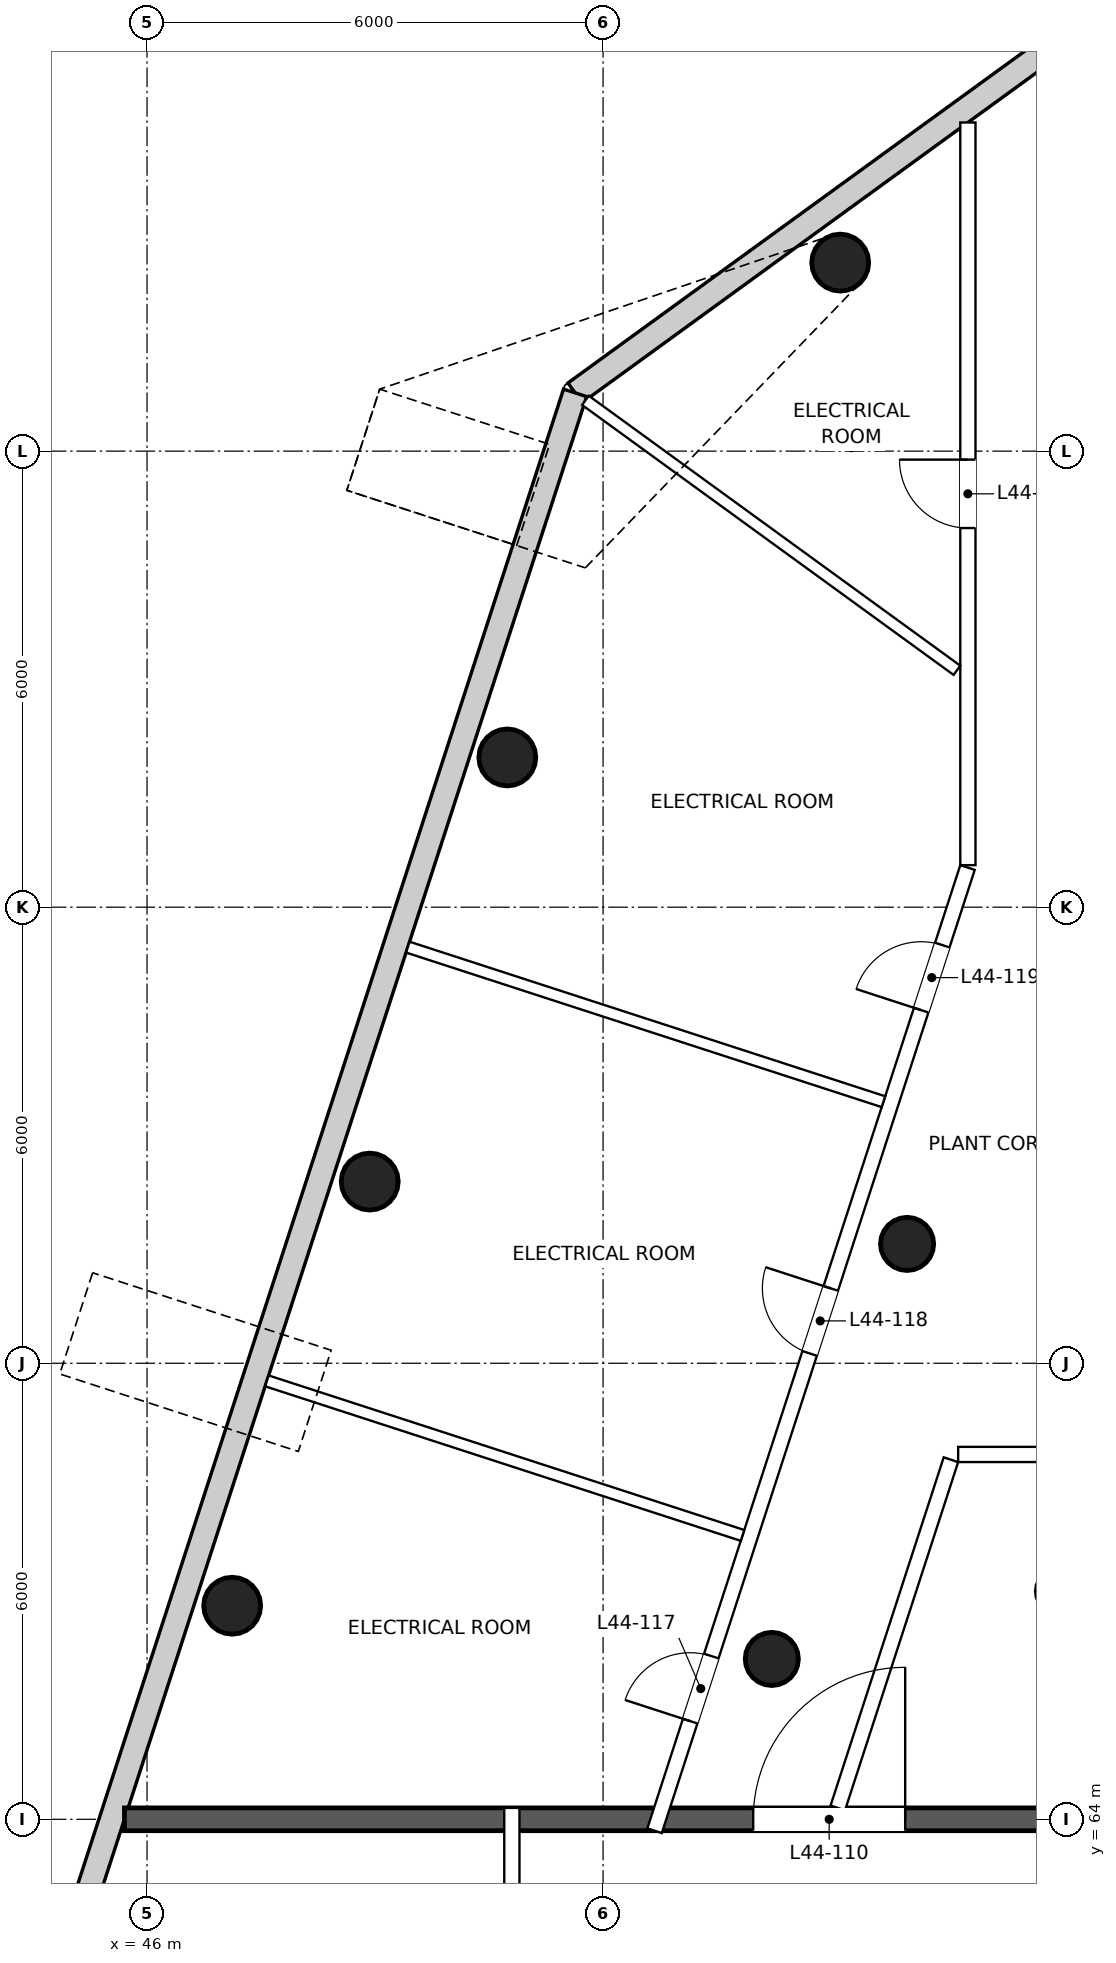
"""IFC4 building model, lengths in metres.
Left out: names, types, materials, properties, quantities, classifications, styles, units other than length and angle.
Written with IfcOpenShell. Run it as: python <this file> out.ifc"""

import sys

from ifc_helpers import new_model, si_unit, direction, frame, frame_2d, origin, origin_2d, place, context, subcontext, project, spatial, rectangle, circle, extrude, element, fill, save


model = new_model("IFC4")
c1 = context("Model", 3, precision=1e-05, world=origin(), true_north=direction((0.0, 1.0)))
c2 = subcontext(c1, "Body", "Model", "MODEL_VIEW")
j1 = project(units=[si_unit("LENGTHUNIT", "METRE"), si_unit("PLANEANGLEUNIT", "RADIAN")], contexts=[c1])
p1 = place(None, origin())
s1 = spatial("IfcSite", under=j1, at=p1, CompositionType="ELEMENT")
p2 = place(p1, origin())
s2 = spatial("IfcBuilding", under=s1, at=p2, CompositionType="ELEMENT")
p3 = place(p2, frame((0.0, 0.0, 191.5)))
s3 = spatial("IfcBuildingStorey", under=s2, at=p3, CompositionType="ELEMENT", Elevation=191.5)
for number, where, z_axis, x_axis in (
    (1, (55.12, 84.48, 0.0), (0.0, 0.0, 1.0), (1.0, 0.0, 0.0)),
    (2, (50.74, 77.97, 0.0), (0.0, 0.0, 1.0), (1.0, 0.0, 0.0)),
    (3, (48.93, 72.39, 0.0), (0.0, 0.0, 1.0), (1.0, 0.0, 0.0)),
    (4, (47.12, 66.81, 0.0), (0.0, 0.0, 1.0), (1.0, 0.0, 0.0)),
):
    element("IfcColumn", number, at=place(p3, frame(where, z_axis=z_axis, x_axis=x_axis)), inside=s3, PredefinedType="COLUMN", context=c2, shape_type="SweptSolid", body=[
        extrude(circle(Radius=0.375, at=origin_2d()), origin(), (0.0, 0.0, 1.0), 5.0),
    ])
for number, where, z_axis, x_axis in (
    (5, (56.0, 71.57, 0.0), (0.0, 0.0, 1.0), (1.0, 0.0, 0.0)),
    (6, (54.22, 66.11, 0.0), (0.0, 0.0, 1.0), (1.0, 0.0, 0.0)),
):
    element("IfcColumn", number, at=place(p3, frame(where, z_axis=z_axis, x_axis=x_axis)), inside=s3, PredefinedType="COLUMN", context=c2, shape_type="SweptSolid", body=[
        extrude(circle(Radius=0.35, at=origin_2d()), origin(), (0.0, 0.0, 1.0), 5.0),
    ])
p4 = place(p3, frame((58.615, 87.84, 0.0), z_axis=(0.0, 0.0, 1.0), x_axis=(-0.809011202415, -0.587793224159, 0.0)))
e7 = element("IfcWall", 7, at=p4, inside=s3, PredefinedType="SOLIDWALL", context=c2, shape_type="SweptSolid", body=[
    extrude(rectangle(XDim=8.631, YDim=0.32, at=frame_2d((4.316, 0.0))), origin(), (0.0, 0.0, 1.0), 4.7),
])
p5 = place(p3, frame((51.632, 82.767, 0.0), z_axis=(0.0, 0.0, 1.0), x_axis=(-0.309022366866, -0.95105477065, 0.0)))
e8 = element("IfcWall", 8, at=p5, inside=s3, PredefinedType="SOLIDWALL", context=c2, shape_type="SweptSolid", body=[
    extrude(rectangle(XDim=21.231, YDim=0.32, at=frame_2d((10.615, 0.0))), origin(), (0.0, 0.0, 1.0), 4.7),
])
p6 = place(p3, frame((45.703, 64.0, 0.0), z_axis=(0.0, 0.0, 1.0), x_axis=(1.0, 0.0, 0.0)))
e9 = element("IfcWall", 9, at=p6, inside=s3, PredefinedType="PARTITIONING", context=c2, shape_type="SweptSolid", body=[
    extrude(rectangle(XDim=48.595, YDim=0.3, at=frame_2d((24.297, 0.0))), origin(), (0.0, 0.0, 1.0), 3.7),
])
p7 = place(p6, frame((8.272, 0.0, 0.0)))
e10 = element("IfcOpeningElement", 10, at=p7, cuts=e9, PredefinedType="OPENING", context=c2, shape_type="SweptSolid", body=[
    extrude(rectangle(XDim=2.0, YDim=2.1, at=frame_2d((1.0, 1.05))), frame((0.0, 0.16, 0.0), z_axis=(0.0, -1.0, 0.0), x_axis=(1.0, 0.0, 0.0)), (0.0, 0.0, 1.0), 0.32),
])
p8 = place(p6, frame((16.322, 0.0, 0.0)))
e11 = element("IfcOpeningElement", 11, at=p8, cuts=e9, PredefinedType="OPENING", context=c2, shape_type="SweptSolid", body=[
    extrude(rectangle(XDim=2.0, YDim=2.1, at=frame_2d((1.0, 1.05))), frame((0.0, 0.16, 0.0), z_axis=(0.0, -1.0, 0.0), x_axis=(1.0, 0.0, 0.0)), (0.0, 0.0, 1.0), 0.32),
])
p9 = place(p6, frame((23.697, 0.0, 0.0)))
e12 = element("IfcOpeningElement", 12, at=p9, cuts=e9, PredefinedType="OPENING", context=c2, shape_type="SweptSolid", body=[
    extrude(rectangle(XDim=1.2, YDim=2.1, at=frame_2d((0.6, 1.05))), frame((0.0, 0.16, 0.0), z_axis=(0.0, -1.0, 0.0), x_axis=(1.0, 0.0, 0.0)), (0.0, 0.0, 1.0), 0.32),
])
p10 = place(p6, frame((30.272, 0.0, 0.0)))
e13 = element("IfcOpeningElement", 13, at=p10, cuts=e9, PredefinedType="OPENING", context=c2, shape_type="SweptSolid", body=[
    extrude(rectangle(XDim=2.0, YDim=2.1, at=frame_2d((1.0, 1.05))), frame((0.0, 0.16, 0.0), z_axis=(0.0, -1.0, 0.0), x_axis=(1.0, 0.0, 0.0)), (0.0, 0.0, 1.0), 0.32),
])
p11 = place(p6, frame((38.322, 0.0, 0.0)))
e14 = element("IfcOpeningElement", 14, at=p11, cuts=e9, PredefinedType="OPENING", context=c2, shape_type="SweptSolid", body=[
    extrude(rectangle(XDim=2.0, YDim=2.1, at=frame_2d((1.0, 1.05))), frame((0.0, 0.16, 0.0), z_axis=(0.0, -1.0, 0.0), x_axis=(1.0, 0.0, 0.0)), (0.0, 0.0, 1.0), 0.32),
])
p12 = place(p3, frame((52.678, 63.85, 0.0), z_axis=(0.0, 0.0, 1.0), x_axis=(0.309023094896, 0.951054534094, 0.0)))
e15 = element("IfcWall", 15, at=p12, inside=s3, PredefinedType="PARTITIONING", context=c2, shape_type="SweptSolid", body=[
    extrude(rectangle(XDim=13.324, YDim=0.2, at=frame_2d((6.662, 0.0))), origin(), (0.0, 0.0, 1.0), 3.7),
])
p13 = place(p12, frame((1.516, 0.0, 0.0)))
e16 = element("IfcOpeningElement", 16, at=p13, cuts=e15, PredefinedType="OPENING", context=c2, shape_type="SweptSolid", body=[
    extrude(rectangle(XDim=0.9, YDim=2.1, at=frame_2d((0.45, 1.05))), frame((0.0, 0.11, 0.0), z_axis=(0.0, -1.0, 0.0), x_axis=(1.0, 0.0, 0.0)), (0.0, 0.0, 1.0), 0.22),
])
p14 = place(p12, frame((6.602, 0.0, 0.0)))
e17 = element("IfcOpeningElement", 17, at=p14, cuts=e15, PredefinedType="OPENING", context=c2, shape_type="SweptSolid", body=[
    extrude(rectangle(XDim=0.9, YDim=2.1, at=frame_2d((0.45, 1.05))), frame((0.0, 0.11, 0.0), z_axis=(0.0, -1.0, 0.0), x_axis=(1.0, 0.0, 0.0)), (0.0, 0.0, 1.0), 0.22),
])
p15 = place(p12, frame((11.351, 0.0, 0.0)))
e18 = element("IfcOpeningElement", 18, at=p15, cuts=e15, PredefinedType="OPENING", context=c2, shape_type="SweptSolid", body=[
    extrude(rectangle(XDim=0.9, YDim=2.1, at=frame_2d((0.45, 1.05))), frame((0.0, 0.11, 0.0), z_axis=(0.0, -1.0, 0.0), x_axis=(1.0, 0.0, 0.0)), (0.0, 0.0, 1.0), 0.22),
])
p16 = place(p3, frame((56.8, 76.553, 0.0), z_axis=(0.0, 0.0, 1.0), x_axis=(0.0, 1.0, 0.0)))
e19 = element("IfcWall", 19, at=p16, inside=s3, PredefinedType="PARTITIONING", context=c2, shape_type="SweptSolid", body=[
    extrude(rectangle(XDim=9.771, YDim=0.2, at=frame_2d((4.885, 0.0))), origin(), (0.0, 0.0, 1.0), 4.25),
])
p17 = place(p16, frame((4.435, 0.0, 0.0)))
e20 = element("IfcOpeningElement", 20, at=p17, cuts=e19, PredefinedType="OPENING", context=c2, shape_type="SweptSolid", body=[
    extrude(rectangle(XDim=0.9, YDim=2.1, at=frame_2d((0.45, 1.05))), frame((0.0, 0.11, 0.0), z_axis=(0.0, -1.0, 0.0), x_axis=(1.0, 0.0, 0.0)), (0.0, 0.0, 1.0), 0.22),
])
p18 = place(p3, frame((50.8, 55.8, 0.0), z_axis=(0.0, 0.0, 1.0), x_axis=(0.0, 1.0, 0.0)))
e21 = element("IfcWall", 21, at=p18, inside=s3, PredefinedType="PARTITIONING", context=c2, shape_type="SweptSolid", body=[
    extrude(rectangle(XDim=8.35, YDim=0.2, at=frame_2d((4.175, 0.0))), origin(), (0.0, 0.0, 1.0), 4.25),
])
p19 = place(p18, frame((3.574, 0.0, 0.0)))
e22 = element("IfcOpeningElement", 22, at=p19, cuts=e21, PredefinedType="OPENING", context=c2, shape_type="SweptSolid", body=[
    extrude(rectangle(XDim=0.9, YDim=2.1, at=frame_2d((0.45, 1.05))), frame((0.0, 0.11, 0.0), z_axis=(0.0, -1.0, 0.0), x_axis=(1.0, 0.0, 0.0)), (0.0, 0.0, 1.0), 0.22),
])
p20 = place(p3, frame((68.8, 68.8, 0.0), z_axis=(0.0, 0.0, 1.0), x_axis=(-1.0, 0.0, 0.0)))
e23 = element("IfcWall", 23, at=p20, inside=s3, PredefinedType="PARTITIONING", context=c2, shape_type="SweptSolid", body=[
    extrude(rectangle(XDim=12.128, YDim=0.2, at=frame_2d((6.064, 0.0))), origin(), (0.0, 0.0, 1.0), 4.7),
])
p21 = place(p20, frame((8.894, 0.0, 0.0)))
e24 = element("IfcOpeningElement", 24, at=p21, cuts=e23, PredefinedType="OPENING", context=c2, shape_type="SweptSolid", body=[
    extrude(rectangle(XDim=0.9, YDim=2.1, at=frame_2d((0.45, 1.05))), frame((0.0, 0.11, 0.0), z_axis=(0.0, -1.0, 0.0), x_axis=(1.0, 0.0, 0.0)), (0.0, 0.0, 1.0), 0.22),
])
p22 = place(p3, frame((56.577, 68.731, 0.0), z_axis=(0.0, 0.0, 1.0), x_axis=(-0.309026476021, -0.951053435469, 0.0)))
e25 = element("IfcWall", 25, at=p22, inside=s3, PredefinedType="PARTITIONING", context=c2, shape_type="SweptSolid", body=[
    extrude(rectangle(XDim=4.817, YDim=0.2, at=frame_2d((2.408, 0.0))), origin(), (0.0, 0.0, 1.0), 3.7),
])
p23 = place(p3, frame((51.768, 82.668, 0.0), z_axis=(0.0, 0.0, 1.0), x_axis=(0.809024323682, -0.587775164234, 0.0)))
e26 = element("IfcWall", 26, at=p23, inside=s3, PredefinedType="PARTITIONING", context=c2, shape_type="SweptSolid", body=[
    extrude(rectangle(XDim=6.042, YDim=0.15, at=frame_2d((3.021, 0.0))), origin(), (0.0, 0.0, 1.0), 4.25),
])
p24 = place(p3, frame((49.431, 75.475, 0.0), z_axis=(0.0, 0.0, 1.0), x_axis=(0.95105288048, -0.309028184041, 0.0)))
e27 = element("IfcWall", 27, at=p24, inside=s3, PredefinedType="PARTITIONING", context=c2, shape_type="SweptSolid", body=[
    extrude(rectangle(XDim=6.58, YDim=0.15, at=frame_2d((3.29, 0.0))), origin(), (0.0, 0.0, 1.0), 3.7),
])
p25 = place(p3, frame((47.577, 69.768, 0.0), z_axis=(0.0, 0.0, 1.0), x_axis=(0.951060241863, -0.309005528021, 0.0)))
e28 = element("IfcWall", 28, at=p25, inside=s3, PredefinedType="PARTITIONING", context=c2, shape_type="SweptSolid", body=[
    extrude(rectangle(XDim=6.58, YDim=0.15, at=frame_2d((3.29, 0.0))), origin(), (0.0, 0.0, 1.0), 3.7),
])
p26 = place(p7, origin())
e29 = element("IfcDoor", 29, at=p26, inside=s3, OperationType="DOUBLE_DOOR_SINGLE_SWING", PredefinedType="DOOR", context=c2, shape_type="SweptSolid", body=[
    extrude(rectangle(XDim=2.0, YDim=2.1, at=frame_2d((1.0, 1.05))), frame((0.0, 0.025, 0.0), z_axis=(0.0, -1.0, 0.0), x_axis=(1.0, 0.0, 0.0)), (0.0, 0.0, 1.0), 0.05),
])
fill(e10, e29)
p27 = place(p13, origin())
e30 = element("IfcDoor", 30, at=p27, inside=s3, OperationType="SINGLE_SWING_LEFT", PredefinedType="DOOR", context=c2, shape_type="SweptSolid", body=[
    extrude(rectangle(XDim=0.9, YDim=2.1, at=frame_2d((0.45, 1.05))), frame((0.0, 0.025, 0.0), z_axis=(0.0, -1.0, 0.0), x_axis=(1.0, 0.0, 0.0)), (0.0, 0.0, 1.0), 0.05),
])
fill(e16, e30)
p28 = place(p14, origin())
e31 = element("IfcDoor", 31, at=p28, inside=s3, OperationType="SINGLE_SWING_RIGHT", PredefinedType="DOOR", context=c2, shape_type="SweptSolid", body=[
    extrude(rectangle(XDim=0.9, YDim=2.1, at=frame_2d((0.45, 1.05))), frame((0.0, 0.025, 0.0), z_axis=(0.0, -1.0, 0.0), x_axis=(1.0, 0.0, 0.0)), (0.0, 0.0, 1.0), 0.05),
])
fill(e17, e31)
p29 = place(p15, origin())
e32 = element("IfcDoor", 32, at=p29, inside=s3, OperationType="SINGLE_SWING_LEFT", PredefinedType="DOOR", context=c2, shape_type="SweptSolid", body=[
    extrude(rectangle(XDim=0.9, YDim=2.1, at=frame_2d((0.45, 1.05))), frame((0.0, 0.025, 0.0), z_axis=(0.0, -1.0, 0.0), x_axis=(1.0, 0.0, 0.0)), (0.0, 0.0, 1.0), 0.05),
])
fill(e18, e32)
p30 = place(p17, origin())
e33 = element("IfcDoor", 33, at=p30, inside=s3, OperationType="SINGLE_SWING_RIGHT", PredefinedType="DOOR", context=c2, shape_type="SweptSolid", body=[
    extrude(rectangle(XDim=0.9, YDim=2.1, at=frame_2d((0.45, 1.05))), frame((0.0, 0.025, 0.0), z_axis=(0.0, -1.0, 0.0), x_axis=(1.0, 0.0, 0.0)), (0.0, 0.0, 1.0), 0.05),
])
fill(e20, e33)
save(model, sys.argv[1])
